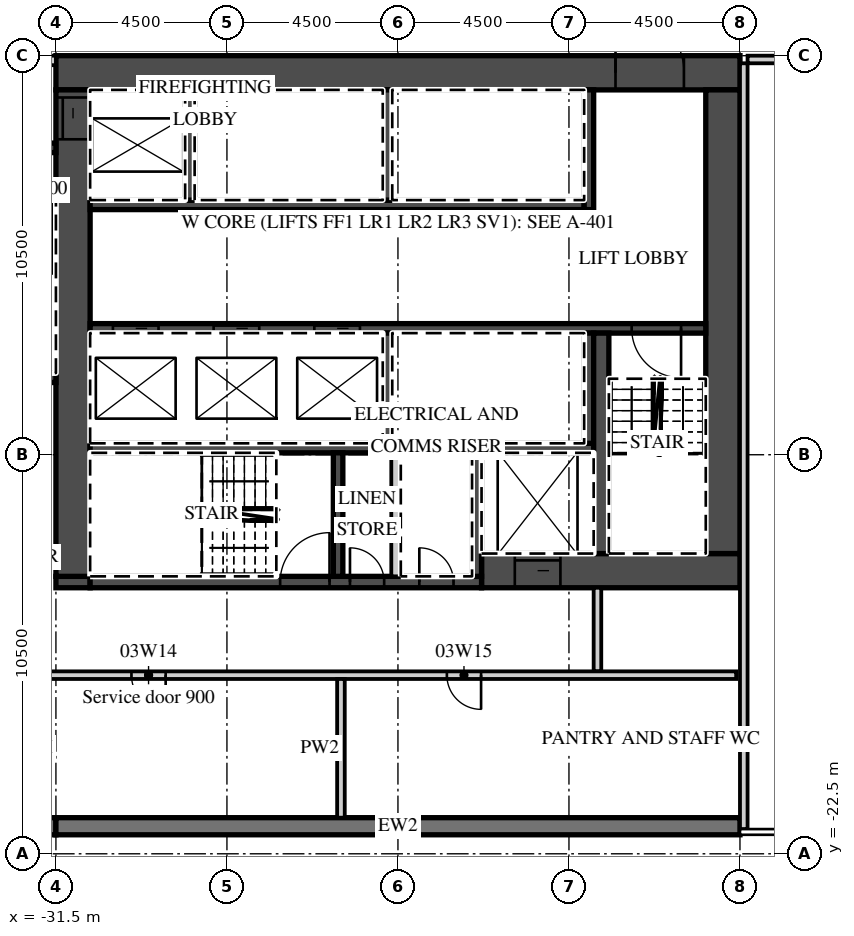
"""IFC4 building model, lengths in metres.
Left out: names, types, materials, properties, quantities, classifications, styles, units other than length and angle.
Written with IfcOpenShell. Run it as: python <this file> out.ifc"""

import sys

from ifc_helpers import new_model, si_unit, direction, frame, frame_2d, origin, place, context, subcontext, project, spatial, rectangle, extrude, element, fill, save


model = new_model("IFC4")
c1 = context("Model", 3, precision=1e-05, world=origin(), true_north=direction((0.0, 1.0)))
c2 = subcontext(c1, "Body", "Model", "MODEL_VIEW")
j1 = project(units=[si_unit("LENGTHUNIT", "METRE"), si_unit("PLANEANGLEUNIT", "RADIAN")], contexts=[c1])
p1 = place(None, origin())
s1 = spatial("IfcSite", under=j1, at=p1, CompositionType="ELEMENT")
p2 = place(p1, origin())
s2 = spatial("IfcBuilding", under=s1, at=p2, CompositionType="ELEMENT")
p3 = place(p2, frame((0.0, 0.0, 23.5)))
s3 = spatial("IfcBuildingStorey", under=s2, at=p3, CompositionType="ELEMENT", Elevation=23.5)
p4 = place(p3, frame((-41.0, -21.775, 0.0), z_axis=(0.0, 0.0, 1.0), x_axis=(1.0, 0.0, 0.0)))
e1 = element("IfcWall", 1, at=p4, inside=s3, PredefinedType="SOLIDWALL", context=c2, shape_type="SweptSolid", body=[
    extrude(rectangle(XDim=9.5, YDim=0.45, at=frame_2d((4.75, 0.0))), origin(), (0.0, 0.0, 1.0), 5.05),
])
p5 = place(p3, frame((-31.5, -21.775, 0.0), z_axis=(0.0, 0.0, 1.0), x_axis=(1.0, 0.0, 0.0)))
e2 = element("IfcWall", 2, at=p5, inside=s3, PredefinedType="SOLIDWALL", context=c2, shape_type="SweptSolid", body=[
    extrude(rectangle(XDim=18.0, YDim=0.45, at=frame_2d((9.0, 0.0))), origin(), (0.0, 0.0, 1.0), 5.05),
])
p6 = place(p3, frame((-31.5, -1.95, 0.0), z_axis=(0.0, 0.0, 1.0), x_axis=(1.0, 0.0, 0.0)))
e3 = element("IfcWall", 3, at=p6, inside=s3, PredefinedType="SHEAR", context=c2, shape_type="SweptSolid", body=[
    extrude(rectangle(XDim=18.0, YDim=0.9, at=frame_2d((9.0, 0.0))), origin(), (0.0, 0.0, 1.0), 5.05),
])
p7 = place(p6, frame((14.725, 0.0, 0.0)))
e4 = element("IfcOpeningElement", 4, at=p7, cuts=e3, PredefinedType="OPENING", context=c2, shape_type="SweptSolid", body=[
    extrude(rectangle(XDim=1.8, YDim=2.1, at=frame_2d((0.9, 1.05))), frame((0.0, 0.46, 0.0), z_axis=(0.0, -1.0, 0.0), x_axis=(1.0, 0.0, 0.0)), (0.0, 0.0, 1.0), 0.92),
])
p8 = place(p3, frame((-20.3, -15.05, 0.0), z_axis=(0.0, 0.0, 1.0), x_axis=(1.0, 0.0, 0.0)))
e5 = element("IfcWall", 5, at=p8, inside=s3, PredefinedType="SHEAR", context=c2, shape_type="SweptSolid", body=[
    extrude(rectangle(XDim=6.8, YDim=0.9, at=frame_2d((3.4, 0.0))), origin(), (0.0, 0.0, 1.0), 5.05),
])
p9 = place(p8, frame((0.875, 0.0, 0.0)))
e6 = element("IfcOpeningElement", 6, at=p9, cuts=e5, PredefinedType="OPENING", context=c2, shape_type="SweptSolid", body=[
    extrude(rectangle(XDim=1.2, YDim=2.1, at=frame_2d((0.6, 1.05))), frame((0.0, 0.46, 0.0), z_axis=(0.0, -1.0, 0.0), x_axis=(1.0, 0.0, 0.0)), (0.0, 0.0, 1.0), 0.92),
])
p10 = place(p3, frame((-31.5, -15.35, 0.0), z_axis=(0.0, 0.0, 1.0), x_axis=(1.0, 0.0, 0.0)))
e7 = element("IfcWall", 7, at=p10, inside=s3, PredefinedType="SHEAR", context=c2, shape_type="SweptSolid", body=[
    extrude(rectangle(XDim=0.9, YDim=0.3, at=frame_2d((0.45, 0.0))), origin(), (0.0, 0.0, 1.0), 5.05),
])
p11 = place(p3, frame((-30.6, -15.35, 0.0), z_axis=(0.0, 0.0, 1.0), x_axis=(1.0, 0.0, 0.0)))
e8 = element("IfcWall", 8, at=p11, inside=s3, PredefinedType="SHEAR", context=c2, shape_type="SweptSolid", body=[
    extrude(rectangle(XDim=10.3, YDim=0.3, at=frame_2d((5.15, 0.0))), origin(), (0.0, 0.0, 1.0), 5.05),
])
p12 = place(p11, frame((5.0, 0.0, 0.0)))
e9 = element("IfcOpeningElement", 9, at=p12, cuts=e8, PredefinedType="OPENING", context=c2, shape_type="SweptSolid", body=[
    extrude(rectangle(XDim=1.3, YDim=2.1, at=frame_2d((0.65, 1.05))), frame((0.0, 0.16, 0.0), z_axis=(0.0, -1.0, 0.0), x_axis=(1.0, 0.0, 0.0)), (0.0, 0.0, 1.0), 0.32),
])
p13 = place(p11, frame((6.837, 0.0, 0.0)))
e10 = element("IfcOpeningElement", 10, at=p13, cuts=e8, PredefinedType="OPENING", context=c2, shape_type="SweptSolid", body=[
    extrude(rectangle(XDim=0.9, YDim=2.1, at=frame_2d((0.45, 1.05))), frame((0.0, 0.16, 0.0), z_axis=(0.0, -1.0, 0.0), x_axis=(1.0, 0.0, 0.0)), (0.0, 0.0, 1.0), 0.32),
])
p14 = place(p11, frame((8.663, 0.0, 0.0)))
e11 = element("IfcOpeningElement", 11, at=p14, cuts=e8, PredefinedType="OPENING", context=c2, shape_type="SweptSolid", body=[
    extrude(rectangle(XDim=0.9, YDim=2.1, at=frame_2d((0.45, 1.05))), frame((0.0, 0.16, 0.0), z_axis=(0.0, -1.0, 0.0), x_axis=(1.0, 0.0, 0.0)), (0.0, 0.0, 1.0), 0.32),
])
p15 = place(p3, frame((-31.05, -15.2, 0.0), z_axis=(0.0, 0.0, 1.0), x_axis=(0.0, 1.0, 0.0)))
e12 = element("IfcWall", 12, at=p15, inside=s3, PredefinedType="SHEAR", context=c2, shape_type="SweptSolid", body=[
    extrude(rectangle(XDim=12.8, YDim=0.9, at=frame_2d((6.4, 0.0))), origin(), (0.0, 0.0, 1.0), 5.05),
])
p16 = place(p15, frame((11.5, 0.0, 0.0)))
e13 = element("IfcOpeningElement", 13, at=p16, cuts=e12, PredefinedType="OPENING", context=c2, shape_type="SweptSolid", body=[
    extrude(rectangle(XDim=1.1, YDim=2.1, at=frame_2d((0.55, 1.05))), frame((0.0, 0.46, 0.0), z_axis=(0.0, -1.0, 0.0), x_axis=(1.0, 0.0, 0.0)), (0.0, 0.0, 1.0), 0.92),
])
p17 = place(p3, frame((-13.95, -14.6, 0.0), z_axis=(0.0, 0.0, 1.0), x_axis=(0.0, 1.0, 0.0)))
e14 = element("IfcWall", 14, at=p17, inside=s3, PredefinedType="SHEAR", context=c2, shape_type="SweptSolid", body=[
    extrude(rectangle(XDim=12.2, YDim=0.9, at=frame_2d((6.1, 0.0))), origin(), (0.0, 0.0, 1.0), 5.05),
])
p18 = place(p3, frame((-30.6, -5.425, 0.0), z_axis=(0.0, 0.0, 1.0), x_axis=(1.0, 0.0, 0.0)))
e15 = element("IfcWall", 15, at=p18, inside=s3, PredefinedType="SHEAR", context=c2, shape_type="SweptSolid", body=[
    extrude(rectangle(XDim=13.0, YDim=0.25, at=frame_2d((6.5, 0.0))), origin(), (0.0, 0.0, 1.0), 5.05),
])
p19 = place(p3, frame((-17.475, -5.55, 0.0), z_axis=(0.0, 0.0, 1.0), x_axis=(0.0, 1.0, 0.0)))
e16 = element("IfcWall", 16, at=p19, inside=s3, PredefinedType="SHEAR", context=c2, shape_type="SweptSolid", body=[
    extrude(rectangle(XDim=3.15, YDim=0.25, at=frame_2d((1.575, 0.0))), origin(), (0.0, 0.0, 1.0), 5.05),
])
for number, where, z_axis, x_axis in (
    (17, (-27.975, -5.3, 0.0), (0.0, 0.0, 1.0), (0.0, 1.0, 0.0)),
    (18, (-22.775, -5.3, 0.0), (0.0, 0.0, 1.0), (0.0, 1.0, 0.0)),
):
    element("IfcWall", number, at=place(p3, frame(where, z_axis=z_axis, x_axis=x_axis)), inside=s3, PredefinedType="SHEAR", context=c2, shape_type="SweptSolid", body=[
        extrude(rectangle(XDim=2.9, YDim=0.25, at=frame_2d((1.45, 0.0))), origin(), (0.0, 0.0, 1.0), 5.05),
    ])
p20 = place(p3, frame((-30.6, -8.675, 0.0), z_axis=(0.0, 0.0, 1.0), x_axis=(1.0, 0.0, 0.0)))
e19 = element("IfcWall", 19, at=p20, inside=s3, PredefinedType="SHEAR", context=c2, shape_type="SweptSolid", body=[
    extrude(rectangle(XDim=16.2, YDim=0.25, at=frame_2d((8.1, 0.0))), origin(), (0.0, 0.0, 1.0), 5.05),
])
p21 = place(p20, frame((0.6, 0.0, 0.0)))
e20 = element("IfcOpeningElement", 20, at=p21, cuts=e19, PredefinedType="OPENING", context=c2, shape_type="SweptSolid", body=[
    extrude(rectangle(XDim=1.2, YDim=2.1, at=frame_2d((0.6, 1.05))), frame((0.0, 0.135, 0.0), z_axis=(0.0, -1.0, 0.0), x_axis=(1.0, 0.0, 0.0)), (0.0, 0.0, 1.0), 0.27),
])
p22 = place(p20, frame((3.25, 0.0, 0.0)))
e21 = element("IfcOpeningElement", 21, at=p22, cuts=e19, PredefinedType="OPENING", context=c2, shape_type="SweptSolid", body=[
    extrude(rectangle(XDim=1.2, YDim=2.1, at=frame_2d((0.6, 1.05))), frame((0.0, 0.135, 0.0), z_axis=(0.0, -1.0, 0.0), x_axis=(1.0, 0.0, 0.0)), (0.0, 0.0, 1.0), 0.27),
])
p23 = place(p20, frame((5.9, 0.0, 0.0)))
e22 = element("IfcOpeningElement", 22, at=p23, cuts=e19, PredefinedType="OPENING", context=c2, shape_type="SweptSolid", body=[
    extrude(rectangle(XDim=1.2, YDim=2.1, at=frame_2d((0.6, 1.05))), frame((0.0, 0.135, 0.0), z_axis=(0.0, -1.0, 0.0), x_axis=(1.0, 0.0, 0.0)), (0.0, 0.0, 1.0), 0.27),
])
p24 = place(p20, frame((14.25, 0.0, 0.0)))
e23 = element("IfcOpeningElement", 23, at=p24, cuts=e19, PredefinedType="OPENING", context=c2, shape_type="SweptSolid", body=[
    extrude(rectangle(XDim=1.3, YDim=2.1, at=frame_2d((0.65, 1.05))), frame((0.0, 0.135, 0.0), z_axis=(0.0, -1.0, 0.0), x_axis=(1.0, 0.0, 0.0)), (0.0, 0.0, 1.0), 0.27),
])
p25 = place(p3, frame((-30.6, -11.825, 0.0), z_axis=(0.0, 0.0, 1.0), x_axis=(1.0, 0.0, 0.0)))
e24 = element("IfcWall", 24, at=p25, inside=s3, PredefinedType="SHEAR", context=c2, shape_type="SweptSolid", body=[
    extrude(rectangle(XDim=13.25, YDim=0.25, at=frame_2d((6.625, 0.0))), origin(), (0.0, 0.0, 1.0), 5.05),
])
for number, where, z_axis, x_axis in (
    (25, (-17.475, -11.7, 0.0), (0.0, 0.0, 1.0), (0.0, 1.0, 0.0)),
    (26, (-22.775, -11.7, 0.0), (0.0, 0.0, 1.0), (0.0, 1.0, 0.0)),
):
    element("IfcWall", number, at=place(p3, frame(where, z_axis=z_axis, x_axis=x_axis)), inside=s3, PredefinedType="SHEAR", context=c2, shape_type="SweptSolid", body=[
        extrude(rectangle(XDim=2.9, YDim=0.25, at=frame_2d((1.45, 0.0))), origin(), (0.0, 0.0, 1.0), 5.05),
    ])
p26 = place(p3, frame((-17.15, -14.6, 0.0), z_axis=(0.0, 0.0, 1.0), x_axis=(0.0, 1.0, 0.0)))
e27 = element("IfcWall", 27, at=p26, inside=s3, PredefinedType="SHEAR", context=c2, shape_type="SweptSolid", body=[
    extrude(rectangle(XDim=5.8, YDim=0.4, at=frame_2d((2.9, 0.0))), origin(), (0.0, 0.0, 1.0), 5.05),
])
for number, where, z_axis, x_axis in (
    (28, (-20.425, -15.2, 0.0), (0.0, 0.0, 1.0), (0.0, 1.0, 0.0)),
    (29, (-24.075, -15.2, 0.0), (0.0, 0.0, 1.0), (0.0, 1.0, 0.0)),
):
    element("IfcWall", number, at=place(p3, frame(where, z_axis=z_axis, x_axis=x_axis)), inside=s3, PredefinedType="SHEAR", context=c2, shape_type="SweptSolid", body=[
        extrude(rectangle(XDim=3.25, YDim=0.25, at=frame_2d((1.625, 0.0))), origin(), (0.0, 0.0, 1.0), 5.05),
    ])
p27 = place(p3, frame((-22.55, -15.2, 0.0), z_axis=(0.0, 0.0, 1.0), x_axis=(0.0, 1.0, 0.0)))
e30 = element("IfcWall", 30, at=p27, inside=s3, PredefinedType="PARTITIONING", context=c2, shape_type="SweptSolid", body=[
    extrude(rectangle(XDim=3.25, YDim=0.25, at=frame_2d((1.625, 0.0))), origin(), (0.0, 0.0, 1.0), 5.05),
])
p28 = place(p3, frame((-44.55, -1.625, 0.0), z_axis=(0.0, 0.0, 1.0), x_axis=(1.0, 0.0, 0.0)))
e31 = element("IfcWall", 31, at=p28, inside=s3, PredefinedType="PARTITIONING", context=c2, shape_type="SweptSolid", body=[
    extrude(rectangle(XDim=13.05, YDim=0.25, at=frame_2d((6.525, 0.0))), origin(), (0.0, 0.0, 1.0), 5.05),
])
p29 = place(p28, frame((11.125, 0.0, 0.0)))
e32 = element("IfcOpeningElement", 32, at=p29, cuts=e31, PredefinedType="OPENING", context=c2, shape_type="SweptSolid", body=[
    extrude(rectangle(XDim=1.3, YDim=2.1, at=frame_2d((0.65, 1.05))), frame((0.0, 0.135, 0.0), z_axis=(0.0, -1.0, 0.0), x_axis=(1.0, 0.0, 0.0)), (0.0, 0.0, 1.0), 0.27),
])
p30 = place(p28, frame((8.7, 0.0, 0.0)))
e33 = element("IfcOpeningElement", 33, at=p30, cuts=e31, PredefinedType="OPENING", context=c2, shape_type="SweptSolid", body=[
    extrude(rectangle(XDim=1.1, YDim=2.1, at=frame_2d((0.55, 1.05))), frame((0.0, 0.135, 0.0), z_axis=(0.0, -1.0, 0.0), x_axis=(1.0, 0.0, 0.0)), (0.0, 0.0, 1.0), 0.27),
])
p31 = place(p3, frame((-34.05, -3.925, 0.0), z_axis=(0.0, 0.0, 1.0), x_axis=(1.0, 0.0, 0.0)))
e34 = element("IfcWall", 34, at=p31, inside=s3, PredefinedType="SHEAR", context=c2, shape_type="SweptSolid", body=[
    extrude(rectangle(XDim=2.55, YDim=0.25, at=frame_2d((1.275, 0.0))), origin(), (0.0, 0.0, 1.0), 5.05),
])
p32 = place(p31, frame((0.625, 0.0, 0.0)))
e35 = element("IfcOpeningElement", 35, at=p32, cuts=e34, PredefinedType="OPENING", context=c2, shape_type="SweptSolid", body=[
    extrude(rectangle(XDim=1.3, YDim=2.1, at=frame_2d((0.65, 1.05))), frame((0.0, 0.135, 0.0), z_axis=(0.0, -1.0, 0.0), x_axis=(1.0, 0.0, 0.0)), (0.0, 0.0, 1.0), 0.27),
])
p33 = place(p3, frame((-34.05, -9.975, 0.0), z_axis=(0.0, 0.0, 1.0), x_axis=(1.0, 0.0, 0.0)))
e36 = element("IfcWall", 36, at=p33, inside=s3, PredefinedType="SHEAR", context=c2, shape_type="SweptSolid", body=[
    extrude(rectangle(XDim=2.55, YDim=0.25, at=frame_2d((1.275, 0.0))), origin(), (0.0, 0.0, 1.0), 5.05),
])
p34 = place(p3, frame((-17.25, -17.7, 0.0), z_axis=(0.0, 0.0, 1.0), x_axis=(0.0, 1.0, 0.0)))
e37 = element("IfcWall", 37, at=p34, inside=s3, PredefinedType="PARTITIONING", context=c2, shape_type="SweptSolid", body=[
    extrude(rectangle(XDim=2.2, YDim=0.2, at=frame_2d((1.1, 0.0))), origin(), (0.0, 0.0, 1.0), 5.05),
])
p35 = place(p3, frame((-44.55, -17.8, 0.0), z_axis=(0.0, 0.0, 1.0), x_axis=(1.0, 0.0, 0.0)))
e38 = element("IfcWall", 38, at=p35, inside=s3, PredefinedType="PARTITIONING", context=c2, shape_type="SweptSolid", body=[
    extrude(rectangle(XDim=30.95, YDim=0.2, at=frame_2d((15.475, 0.0))), origin(), (0.0, 0.0, 1.0), 5.05),
])
p36 = place(p35, frame((15.038, 0.0, 0.0)))
e39 = element("IfcOpeningElement", 39, at=p36, cuts=e38, PredefinedType="OPENING", context=c2, shape_type="SweptSolid", body=[
    extrude(rectangle(XDim=0.9, YDim=2.1, at=frame_2d((0.45, 1.05))), frame((0.0, 0.11, 0.0), z_axis=(0.0, -1.0, 0.0), x_axis=(1.0, 0.0, 0.0)), (0.0, 0.0, 1.0), 0.22),
])
p37 = place(p35, frame((23.337, 0.0, 0.0)))
e40 = element("IfcOpeningElement", 40, at=p37, cuts=e38, PredefinedType="OPENING", context=c2, shape_type="SweptSolid", body=[
    extrude(rectangle(XDim=0.9, YDim=2.1, at=frame_2d((0.45, 1.05))), frame((0.0, 0.11, 0.0), z_axis=(0.0, -1.0, 0.0), x_axis=(1.0, 0.0, 0.0)), (0.0, 0.0, 1.0), 0.22),
])
p38 = place(p3, frame((-24.0, -21.55, 0.0), z_axis=(0.0, 0.0, 1.0), x_axis=(0.0, 1.0, 0.0)))
e41 = element("IfcWall", 41, at=p38, inside=s3, PredefinedType="PARTITIONING", context=c2, shape_type="SweptSolid", body=[
    extrude(rectangle(XDim=3.65, YDim=0.2, at=frame_2d((1.825, 0.0))), origin(), (0.0, 0.0, 1.0), 5.05),
])
p39 = place(p3, frame((-13.3, -1.6, 0.0), z_axis=(0.0, 0.0, 1.0), x_axis=(1.0, 0.0, 0.0)))
e42 = element("IfcWall", 42, at=p39, inside=s3, PredefinedType="PARTITIONING", context=c2, shape_type="SweptSolid", body=[
    extrude(rectangle(XDim=52.7, YDim=0.2, at=frame_2d((26.35, 0.0))), origin(), (0.0, 0.0, 1.0), 5.05),
])
p40 = place(p39, frame((4.41, 0.0, 0.0)))
e43 = element("IfcOpeningElement", 43, at=p40, cuts=e42, PredefinedType="OPENING", context=c2, shape_type="SweptSolid", body=[
    extrude(rectangle(XDim=1.8, YDim=2.1, at=frame_2d((0.9, 1.05))), frame((0.0, 0.11, 0.0), z_axis=(0.0, -1.0, 0.0), x_axis=(1.0, 0.0, 0.0)), (0.0, 0.0, 1.0), 0.22),
])
p41 = place(p39, frame((11.49, 0.0, 0.0)))
e44 = element("IfcOpeningElement", 44, at=p41, cuts=e42, PredefinedType="OPENING", context=c2, shape_type="SweptSolid", body=[
    extrude(rectangle(XDim=1.8, YDim=2.1, at=frame_2d((0.9, 1.05))), frame((0.0, 0.11, 0.0), z_axis=(0.0, -1.0, 0.0), x_axis=(1.0, 0.0, 0.0)), (0.0, 0.0, 1.0), 0.22),
])
p42 = place(p39, frame((19.125, 0.0, 0.0)))
e45 = element("IfcOpeningElement", 45, at=p42, cuts=e42, PredefinedType="OPENING", context=c2, shape_type="SweptSolid", body=[
    extrude(rectangle(XDim=1.2, YDim=2.1, at=frame_2d((0.6, 1.05))), frame((0.0, 0.11, 0.0), z_axis=(0.0, -1.0, 0.0), x_axis=(1.0, 0.0, 0.0)), (0.0, 0.0, 1.0), 0.22),
])
p43 = place(p39, frame((30.4, 0.0, 0.0)))
e46 = element("IfcOpeningElement", 46, at=p43, cuts=e42, PredefinedType="OPENING", context=c2, shape_type="SweptSolid", body=[
    extrude(rectangle(XDim=1.8, YDim=2.1, at=frame_2d((0.9, 1.05))), frame((0.0, 0.11, 0.0), z_axis=(0.0, -1.0, 0.0), x_axis=(1.0, 0.0, 0.0)), (0.0, 0.0, 1.0), 0.22),
])
p44 = place(p39, frame((39.8, 0.0, 0.0)))
e47 = element("IfcOpeningElement", 47, at=p44, cuts=e42, PredefinedType="OPENING", context=c2, shape_type="SweptSolid", body=[
    extrude(rectangle(XDim=1.0, YDim=2.1, at=frame_2d((0.5, 1.05))), frame((0.0, 0.11, 0.0), z_axis=(0.0, -1.0, 0.0), x_axis=(1.0, 0.0, 0.0)), (0.0, 0.0, 1.0), 0.22),
])
p45 = place(p39, frame((46.2, 0.0, 0.0)))
e48 = element("IfcOpeningElement", 48, at=p45, cuts=e42, PredefinedType="OPENING", context=c2, shape_type="SweptSolid", body=[
    extrude(rectangle(XDim=1.8, YDim=2.1, at=frame_2d((0.9, 1.05))), frame((0.0, 0.11, 0.0), z_axis=(0.0, -1.0, 0.0), x_axis=(1.0, 0.0, 0.0)), (0.0, 0.0, 1.0), 0.22),
])
p46 = place(p39, frame((49.6, 0.0, 0.0)))
e49 = element("IfcOpeningElement", 49, at=p46, cuts=e42, PredefinedType="OPENING", context=c2, shape_type="SweptSolid", body=[
    extrude(rectangle(XDim=1.8, YDim=2.1, at=frame_2d((0.9, 1.05))), frame((0.0, 0.11, 0.0), z_axis=(0.0, -1.0, 0.0), x_axis=(1.0, 0.0, 0.0)), (0.0, 0.0, 1.0), 0.22),
])
p47 = place(p3, frame((-13.4, -21.85, 0.0), z_axis=(0.0, 0.0, 1.0), x_axis=(0.0, 1.0, 0.0)))
e50 = element("IfcWall", 50, at=p47, inside=s3, PredefinedType="PARTITIONING", context=c2, shape_type="SweptSolid", body=[
    extrude(rectangle(XDim=20.15, YDim=0.2, at=frame_2d((10.075, 0.0))), origin(), (0.0, 0.0, 1.0), 5.05),
])
p48 = place(p21, origin())
e51 = element("IfcDoor", 51, at=p48, inside=s3, OperationType="SLIDING_TO_LEFT", PredefinedType="DOOR", context=c2, shape_type="SweptSolid", body=[
    extrude(rectangle(XDim=1.2, YDim=2.1, at=frame_2d((0.6, 1.05))), frame((0.0, 0.025, 0.0), z_axis=(0.0, -1.0, 0.0), x_axis=(1.0, 0.0, 0.0)), (0.0, 0.0, 1.0), 0.05),
])
fill(e20, e51)
p49 = place(p22, origin())
e52 = element("IfcDoor", 52, at=p49, inside=s3, OperationType="SLIDING_TO_RIGHT", PredefinedType="DOOR", context=c2, shape_type="SweptSolid", body=[
    extrude(rectangle(XDim=1.2, YDim=2.1, at=frame_2d((0.6, 1.05))), frame((0.0, 0.025, 0.0), z_axis=(0.0, -1.0, 0.0), x_axis=(1.0, 0.0, 0.0)), (0.0, 0.0, 1.0), 0.05),
])
fill(e21, e52)
p50 = place(p23, origin())
e53 = element("IfcDoor", 53, at=p50, inside=s3, OperationType="SLIDING_TO_RIGHT", PredefinedType="DOOR", context=c2, shape_type="SweptSolid", body=[
    extrude(rectangle(XDim=1.2, YDim=2.1, at=frame_2d((0.6, 1.05))), frame((0.0, 0.025, 0.0), z_axis=(0.0, -1.0, 0.0), x_axis=(1.0, 0.0, 0.0)), (0.0, 0.0, 1.0), 0.05),
])
fill(e22, e53)
p51 = place(p9, origin())
e54 = element("IfcDoor", 54, at=p51, inside=s3, OperationType="SLIDING_TO_LEFT", PredefinedType="DOOR", context=c2, shape_type="SweptSolid", body=[
    extrude(rectangle(XDim=1.2, YDim=2.1, at=frame_2d((0.6, 1.05))), frame((0.0, 0.025, 0.0), z_axis=(0.0, -1.0, 0.0), x_axis=(1.0, 0.0, 0.0)), (0.0, 0.0, 1.0), 0.05),
])
fill(e6, e54)
p52 = place(p16, origin())
e55 = element("IfcDoor", 55, at=p52, inside=s3, OperationType="SLIDING_TO_RIGHT", PredefinedType="DOOR", context=c2, shape_type="SweptSolid", body=[
    extrude(rectangle(XDim=1.1, YDim=2.1, at=frame_2d((0.55, 1.05))), frame((0.0, 0.025, 0.0), z_axis=(0.0, -1.0, 0.0), x_axis=(1.0, 0.0, 0.0)), (0.0, 0.0, 1.0), 0.05),
])
fill(e13, e55)
p53 = place(p7, origin())
e56 = element("IfcDoor", 56, at=p53, inside=s3, OperationType="DOUBLE_DOOR_DOUBLE_SWING", PredefinedType="DOOR", context=c2, shape_type="SweptSolid", body=[
    extrude(rectangle(XDim=1.8, YDim=2.1, at=frame_2d((0.9, 1.05))), frame((0.0, 0.025, 0.0), z_axis=(0.0, -1.0, 0.0), x_axis=(1.0, 0.0, 0.0)), (0.0, 0.0, 1.0), 0.05),
])
fill(e4, e56)
p54 = place(p24, origin())
e57 = element("IfcDoor", 57, at=p54, inside=s3, OperationType="SINGLE_SWING_RIGHT", PredefinedType="DOOR", context=c2, shape_type="SweptSolid", body=[
    extrude(rectangle(XDim=1.3, YDim=2.1, at=frame_2d((0.65, 1.05))), frame((0.0, 0.025, 0.0), z_axis=(0.0, -1.0, 0.0), x_axis=(1.0, 0.0, 0.0)), (0.0, 0.0, 1.0), 0.05),
])
fill(e23, e57)
p55 = place(p12, origin())
e58 = element("IfcDoor", 58, at=p55, inside=s3, OperationType="SINGLE_SWING_RIGHT", PredefinedType="DOOR", context=c2, shape_type="SweptSolid", body=[
    extrude(rectangle(XDim=1.3, YDim=2.1, at=frame_2d((0.65, 1.05))), frame((0.0, 0.025, 0.0), z_axis=(0.0, -1.0, 0.0), x_axis=(1.0, 0.0, 0.0)), (0.0, 0.0, 1.0), 0.05),
])
fill(e9, e58)
p56 = place(p13, origin())
e59 = element("IfcDoor", 59, at=p56, inside=s3, OperationType="SINGLE_SWING_LEFT", PredefinedType="DOOR", context=c2, shape_type="SweptSolid", body=[
    extrude(rectangle(XDim=0.9, YDim=2.1, at=frame_2d((0.45, 1.05))), frame((0.0, 0.025, 0.0), z_axis=(0.0, -1.0, 0.0), x_axis=(1.0, 0.0, 0.0)), (0.0, 0.0, 1.0), 0.05),
])
fill(e10, e59)
p57 = place(p14, origin())
e60 = element("IfcDoor", 60, at=p57, inside=s3, OperationType="SINGLE_SWING_LEFT", PredefinedType="DOOR", context=c2, shape_type="SweptSolid", body=[
    extrude(rectangle(XDim=0.9, YDim=2.1, at=frame_2d((0.45, 1.05))), frame((0.0, 0.025, 0.0), z_axis=(0.0, -1.0, 0.0), x_axis=(1.0, 0.0, 0.0)), (0.0, 0.0, 1.0), 0.05),
])
fill(e11, e60)
p58 = place(p36, origin())
e61 = element("IfcDoor", 61, at=p58, inside=s3, OperationType="SINGLE_SWING_RIGHT", PredefinedType="DOOR", context=c2, shape_type="SweptSolid", body=[
    extrude(rectangle(XDim=0.9, YDim=2.1, at=frame_2d((0.45, 1.05))), frame((0.0, 0.025, 0.0), z_axis=(0.0, -1.0, 0.0), x_axis=(1.0, 0.0, 0.0)), (0.0, 0.0, 1.0), 0.05),
])
fill(e39, e61)
p59 = place(p37, origin())
e62 = element("IfcDoor", 62, at=p59, inside=s3, OperationType="SINGLE_SWING_RIGHT", PredefinedType="DOOR", context=c2, shape_type="SweptSolid", body=[
    extrude(rectangle(XDim=0.9, YDim=2.1, at=frame_2d((0.45, 1.05))), frame((0.0, 0.025, 0.0), z_axis=(0.0, -1.0, 0.0), x_axis=(1.0, 0.0, 0.0)), (0.0, 0.0, 1.0), 0.05),
])
fill(e40, e62)
save(model, sys.argv[1])
